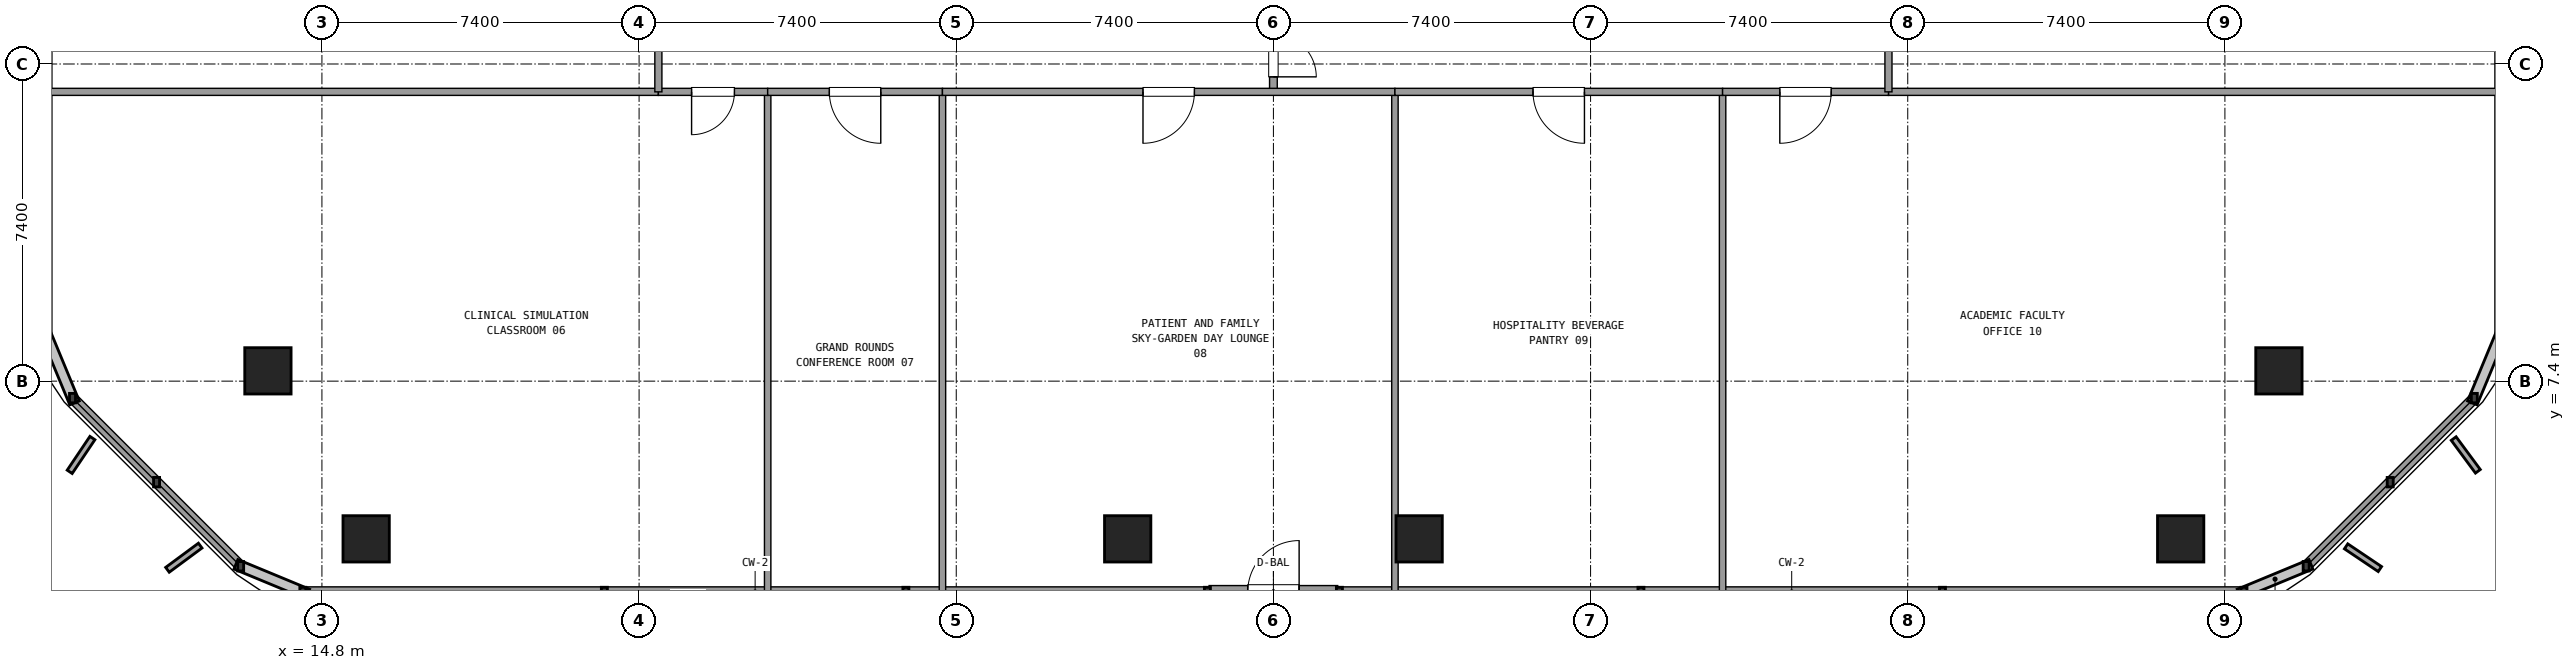
"""IFC4 building model, lengths in metres.
Left out: names, types, materials, properties, quantities, classifications, styles, units other than length and angle.
Written with IfcOpenShell. Run it as: python <this file> out.ifc"""

import sys

from ifc_helpers import new_model, si_unit, direction, frame, frame_2d, origin, origin_2d, place, context, subcontext, project, spatial, rectangle, extrude, element, fill, save


model = new_model("IFC4")
c1 = context("Model", 3, precision=1e-05, world=origin(), true_north=direction((0.0, 1.0)))
c2 = subcontext(c1, "Body", "Model", "MODEL_VIEW")
j1 = project(units=[si_unit("LENGTHUNIT", "METRE"), si_unit("PLANEANGLEUNIT", "RADIAN")], contexts=[c1])
p1 = place(None, origin())
s1 = spatial("IfcSite", under=j1, at=p1, CompositionType="ELEMENT")
p2 = place(p1, origin())
s2 = spatial("IfcBuilding", under=s1, at=p2, CompositionType="ELEMENT")
p3 = place(p2, frame((0.0, 0.0, 52.74)))
s3 = spatial("IfcBuildingStorey", under=s2, at=p3, CompositionType="ELEMENT", Elevation=52.74)
for number, where, z_axis, x_axis in (
    (1, (13.54, 7.64, 0.0), (0.0, 0.0, 1.0), (1.0, 0.0, 0.0)),
    (2, (15.832, 3.72, 0.0), (0.0, 0.0, 1.0), (1.0, 0.0, 0.0)),
    (3, (33.6, 3.72, 0.0), (0.0, 0.0, 1.0), (1.0, 0.0, 0.0)),
    (4, (40.4, 3.72, 0.0), (0.0, 0.0, 1.0), (1.0, 0.0, 0.0)),
    (5, (58.168, 3.72, 0.0), (0.0, 0.0, 1.0), (1.0, 0.0, 0.0)),
    (6, (60.46, 7.64, 0.0), (0.0, 0.0, 1.0), (1.0, 0.0, 0.0)),
):
    element("IfcColumn", number, at=place(p3, frame(where, z_axis=z_axis, x_axis=x_axis)), inside=s3, PredefinedType="COLUMN", context=c2, shape_type="SweptSolid", body=[
        extrude(rectangle(XDim=1.08, YDim=1.08, at=origin_2d()), origin(), (0.0, 0.0, 1.0), 3.6),
    ])
p4 = place(p3, frame((35.5, 2.48, 0.0), z_axis=(0.0, 0.0, 1.0), x_axis=(1.0, 0.0, 0.0)))
e7 = element("IfcWall", 7, at=p4, inside=s3, PredefinedType="SOLIDWALL", context=c2, shape_type="SweptSolid", body=[
    extrude(rectangle(XDim=3.0, YDim=0.3, at=frame_2d((1.5, 0.0))), origin(), (0.0, 0.0, 1.0), 2.65),
])
p5 = place(p4, frame((0.9, 0.0, 0.0)))
e8 = element("IfcOpeningElement", 8, at=p5, cuts=e7, PredefinedType="OPENING", context=c2, shape_type="SweptSolid", body=[
    extrude(rectangle(XDim=1.2, YDim=2.2, at=frame_2d((0.6, 1.1))), frame((0.0, 0.16, 0.0), z_axis=(0.0, -1.0, 0.0), x_axis=(1.0, 0.0, 0.0)), (0.0, 0.0, 1.0), 0.32),
])
for number, where, z_axis, x_axis in (
    (9, (14.355, 2.48, 0.0), (0.0, 0.0, 1.0), (1.0, 0.0, 0.0)),
    (10, (38.54, 2.48, 0.0), (0.0, 0.0, 1.0), (1.0, 0.0, 0.0)),
):
    element("IfcWall", number, at=place(p3, frame(where, z_axis=z_axis, x_axis=x_axis)), inside=s3, PredefinedType="SOLIDWALL", context=c2, shape_type="SweptSolid", body=[
        extrude(rectangle(XDim=21.105, YDim=0.24, at=frame_2d((10.552, 0.0))), origin(), (0.0, 0.0, 1.0), 0.85),
    ])
for number, where, z_axis, x_axis in (
    (11, (61.096, 3.081, 0.0), (0.0, 0.0, 1.0), (0.707, 0.707, 0.0)),
    (12, (8.981, 7.004, 0.0), (0.0, 0.0, 1.0), (0.707, -0.707, 0.0)),
):
    element("IfcWall", number, at=place(p3, frame(where, z_axis=z_axis, x_axis=x_axis)), inside=s3, PredefinedType="SOLIDWALL", context=c2, shape_type="SweptSolid", body=[
        extrude(rectangle(XDim=5.548, YDim=0.24, at=frame_2d((2.774, 0.0))), origin(), (0.0, 0.0, 1.0), 0.85),
    ])
p6 = place(p3, frame((37.0, 14.15, 0.0), z_axis=(0.0, 0.0, 1.0), x_axis=(0.0, 1.0, 0.0)))
e13 = element("IfcWall", 13, at=p6, inside=s3, PredefinedType="PARTITIONING", context=c2, shape_type="SweptSolid", body=[
    extrude(rectangle(XDim=2.7, YDim=0.18, at=frame_2d((1.35, 0.0))), origin(), (0.0, 0.0, 1.0), 2.61),
])
p7 = place(p6, frame((0.35, 0.0, 0.0)))
e14 = element("IfcOpeningElement", 14, at=p7, cuts=e13, PredefinedType="OPENING", context=c2, shape_type="SweptSolid", body=[
    extrude(rectangle(XDim=2.0, YDim=2.2, at=frame_2d((1.0, 1.1))), frame((0.0, 0.1, 0.0), z_axis=(0.0, -1.0, 0.0), x_axis=(1.0, 0.0, 0.0)), (0.0, 0.0, 1.0), 0.2),
])
for number, where, z_axis, x_axis in (
    (15, (8.4, 14.15, 0.0), (0.0, 0.0, 1.0), (1.0, 0.0, 0.0)),
    (16, (51.35, 14.15, 0.0), (0.0, 0.0, 1.0), (1.0, 0.0, 0.0)),
):
    element("IfcWall", number, at=place(p3, frame(where, z_axis=z_axis, x_axis=x_axis)), inside=s3, PredefinedType="PARTITIONING", context=c2, shape_type="SweptSolid", body=[
        extrude(rectangle(XDim=14.25, YDim=0.165, at=frame_2d((7.125, 0.0))), origin(), (0.0, 0.0, 1.0), 2.61),
    ])
p8 = place(p3, frame((25.2, 14.15, 0.0), z_axis=(0.0, 0.0, 1.0), x_axis=(0.0, -1.0, 0.0)))
e17 = element("IfcWall", 17, at=p8, inside=s3, PredefinedType="PARTITIONING", context=c2, shape_type="SweptSolid", body=[
    extrude(rectangle(XDim=11.65, YDim=0.15, at=frame_2d((5.825, 0.0))), origin(), (0.0, 0.0, 1.0), 2.61),
])
p9 = place(p3, frame((22.65, 14.15, 0.0), z_axis=(0.0, 0.0, 1.0), x_axis=(1.0, 0.0, 0.0)))
e18 = element("IfcWall", 18, at=p9, inside=s3, PredefinedType="PARTITIONING", context=c2, shape_type="SweptSolid", body=[
    extrude(rectangle(XDim=2.55, YDim=0.165, at=frame_2d((1.275, 0.0))), origin(), (0.0, 0.0, 1.0), 2.61),
])
p10 = place(p9, frame((0.775, 0.0, 0.0)))
e19 = element("IfcOpeningElement", 19, at=p10, cuts=e18, PredefinedType="OPENING", context=c2, shape_type="SweptSolid", body=[
    extrude(rectangle(XDim=1.0, YDim=2.15, at=frame_2d((0.5, 1.075))), frame((0.0, 0.093, 0.0), z_axis=(0.0, -1.0, 0.0), x_axis=(1.0, 0.0, 0.0)), (0.0, 0.0, 1.0), 0.185),
])
p11 = place(p3, frame((29.278, 14.15, 0.0), z_axis=(0.0, 0.0, 1.0), x_axis=(0.0, -1.0, 0.0)))
e20 = element("IfcWall", 20, at=p11, inside=s3, PredefinedType="PARTITIONING", context=c2, shape_type="SweptSolid", body=[
    extrude(rectangle(XDim=11.65, YDim=0.15, at=frame_2d((5.825, 0.0))), origin(), (0.0, 0.0, 1.0), 2.61),
])
p12 = place(p3, frame((25.2, 14.15, 0.0), z_axis=(0.0, 0.0, 1.0), x_axis=(1.0, 0.0, 0.0)))
e21 = element("IfcWall", 21, at=p12, inside=s3, PredefinedType="PARTITIONING", context=c2, shape_type="SweptSolid", body=[
    extrude(rectangle(XDim=4.078, YDim=0.165, at=frame_2d((2.039, 0.0))), origin(), (0.0, 0.0, 1.0), 2.61),
])
p13 = place(p12, frame((1.439, 0.0, 0.0)))
e22 = element("IfcOpeningElement", 22, at=p13, cuts=e21, PredefinedType="OPENING", context=c2, shape_type="SweptSolid", body=[
    extrude(rectangle(XDim=1.2, YDim=2.15, at=frame_2d((0.6, 1.075))), frame((0.0, 0.093, 0.0), z_axis=(0.0, -1.0, 0.0), x_axis=(1.0, 0.0, 0.0)), (0.0, 0.0, 1.0), 0.185),
])
p14 = place(p3, frame((39.835, 14.15, 0.0), z_axis=(0.0, 0.0, 1.0), x_axis=(0.0, -1.0, 0.0)))
e23 = element("IfcWall", 23, at=p14, inside=s3, PredefinedType="PARTITIONING", context=c2, shape_type="SweptSolid", body=[
    extrude(rectangle(XDim=11.65, YDim=0.15, at=frame_2d((5.825, 0.0))), origin(), (0.0, 0.0, 1.0), 2.61),
])
p15 = place(p3, frame((29.278, 14.15, 0.0), z_axis=(0.0, 0.0, 1.0), x_axis=(1.0, 0.0, 0.0)))
e24 = element("IfcWall", 24, at=p15, inside=s3, PredefinedType="PARTITIONING", context=c2, shape_type="SweptSolid", body=[
    extrude(rectangle(XDim=10.557, YDim=0.165, at=frame_2d((5.278, 0.0))), origin(), (0.0, 0.0, 1.0), 2.61),
])
p16 = place(p15, frame((4.679, 0.0, 0.0)))
e25 = element("IfcOpeningElement", 25, at=p16, cuts=e24, PredefinedType="OPENING", context=c2, shape_type="SweptSolid", body=[
    extrude(rectangle(XDim=1.2, YDim=2.15, at=frame_2d((0.6, 1.075))), frame((0.0, 0.093, 0.0), z_axis=(0.0, -1.0, 0.0), x_axis=(1.0, 0.0, 0.0)), (0.0, 0.0, 1.0), 0.185),
])
p17 = place(p3, frame((47.48, 14.15, 0.0), z_axis=(0.0, 0.0, 1.0), x_axis=(0.0, -1.0, 0.0)))
e26 = element("IfcWall", 26, at=p17, inside=s3, PredefinedType="PARTITIONING", context=c2, shape_type="SweptSolid", body=[
    extrude(rectangle(XDim=11.65, YDim=0.15, at=frame_2d((5.825, 0.0))), origin(), (0.0, 0.0, 1.0), 2.61),
])
p18 = place(p3, frame((39.835, 14.15, 0.0), z_axis=(0.0, 0.0, 1.0), x_axis=(1.0, 0.0, 0.0)))
e27 = element("IfcWall", 27, at=p18, inside=s3, PredefinedType="PARTITIONING", context=c2, shape_type="SweptSolid", body=[
    extrude(rectangle(XDim=7.645, YDim=0.165, at=frame_2d((3.823, 0.0))), origin(), (0.0, 0.0, 1.0), 2.61),
])
p19 = place(p18, frame((3.222, 0.0, 0.0)))
e28 = element("IfcOpeningElement", 28, at=p19, cuts=e27, PredefinedType="OPENING", context=c2, shape_type="SweptSolid", body=[
    extrude(rectangle(XDim=1.2, YDim=2.15, at=frame_2d((0.6, 1.075))), frame((0.0, 0.093, 0.0), z_axis=(0.0, -1.0, 0.0), x_axis=(1.0, 0.0, 0.0)), (0.0, 0.0, 1.0), 0.185),
])
p20 = place(p3, frame((47.48, 14.15, 0.0), z_axis=(0.0, 0.0, 1.0), x_axis=(1.0, 0.0, 0.0)))
e29 = element("IfcWall", 29, at=p20, inside=s3, PredefinedType="PARTITIONING", context=c2, shape_type="SweptSolid", body=[
    extrude(rectangle(XDim=3.87, YDim=0.165, at=frame_2d((1.935, 0.0))), origin(), (0.0, 0.0, 1.0), 2.61),
])
p21 = place(p20, frame((1.335, 0.0, 0.0)))
e30 = element("IfcOpeningElement", 30, at=p21, cuts=e29, PredefinedType="OPENING", context=c2, shape_type="SweptSolid", body=[
    extrude(rectangle(XDim=1.2, YDim=2.15, at=frame_2d((0.6, 1.075))), frame((0.0, 0.093, 0.0), z_axis=(0.0, -1.0, 0.0), x_axis=(1.0, 0.0, 0.0)), (0.0, 0.0, 1.0), 0.185),
])
p22 = place(p3, frame((22.65, 14.15, 0.0), z_axis=(0.0, 0.0, 1.0), x_axis=(0.0, 1.0, 0.0)))
e31 = element("IfcWall", 31, at=p22, inside=s3, PredefinedType="PARTITIONING", context=c2, shape_type="SweptSolid", body=[
    extrude(rectangle(XDim=5.875, YDim=0.165, at=frame_2d((2.938, 0.0))), origin(), (0.0, 0.0, 1.0), 2.61),
])
p23 = place(p22, frame((2.337, 0.0, 0.0)))
e32 = element("IfcOpeningElement", 32, at=p23, cuts=e31, PredefinedType="OPENING", context=c2, shape_type="SweptSolid", body=[
    extrude(rectangle(XDim=1.2, YDim=2.15, at=frame_2d((0.6, 1.075))), frame((0.0, 0.093, 0.0), z_axis=(0.0, -1.0, 0.0), x_axis=(1.0, 0.0, 0.0)), (0.0, 0.0, 1.0), 0.185),
])
p24 = place(p3, frame((51.35, 14.15, 0.0), z_axis=(0.0, 0.0, 1.0), x_axis=(0.0, 1.0, 0.0)))
e33 = element("IfcWall", 33, at=p24, inside=s3, PredefinedType="PARTITIONING", context=c2, shape_type="SweptSolid", body=[
    extrude(rectangle(XDim=7.99, YDim=0.165, at=frame_2d((3.995, 0.0))), origin(), (0.0, 0.0, 1.0), 2.61),
])
p25 = place(p24, frame((3.395, 0.0, 0.0)))
e34 = element("IfcOpeningElement", 34, at=p25, cuts=e33, PredefinedType="OPENING", context=c2, shape_type="SweptSolid", body=[
    extrude(rectangle(XDim=1.2, YDim=2.15, at=frame_2d((0.6, 1.075))), frame((0.0, 0.093, 0.0), z_axis=(0.0, -1.0, 0.0), x_axis=(1.0, 0.0, 0.0)), (0.0, 0.0, 1.0), 0.185),
])
p26 = place(p7, frame((2.0, 0.0, 0.0), z_axis=(0.0, 0.0, 1.0), x_axis=(-1.0, 0.0, 0.0)))
e35 = element("IfcDoor", 35, at=p26, inside=s3, OperationType="DOUBLE_DOOR_SINGLE_SWING", PredefinedType="DOOR", context=c2, shape_type="SweptSolid", body=[
    extrude(rectangle(XDim=2.0, YDim=2.2, at=frame_2d((1.0, 1.1))), frame((0.0, 0.025, 0.0), z_axis=(0.0, -1.0, 0.0), x_axis=(1.0, 0.0, 0.0)), (0.0, 0.0, 1.0), 0.05),
])
fill(e14, e35)
p27 = place(p10, frame((1.0, 0.0, 0.0), z_axis=(0.0, 0.0, 1.0), x_axis=(-1.0, 0.0, 0.0)))
e36 = element("IfcDoor", 36, at=p27, inside=s3, OperationType="SINGLE_SWING_LEFT", PredefinedType="DOOR", context=c2, shape_type="SweptSolid", body=[
    extrude(rectangle(XDim=1.0, YDim=2.15, at=frame_2d((0.5, 1.075))), frame((0.0, 0.025, 0.0), z_axis=(0.0, -1.0, 0.0), x_axis=(1.0, 0.0, 0.0)), (0.0, 0.0, 1.0), 0.05),
])
fill(e19, e36)
p28 = place(p13, frame((1.2, 0.0, 0.0), z_axis=(0.0, 0.0, 1.0), x_axis=(-1.0, 0.0, 0.0)))
e37 = element("IfcDoor", 37, at=p28, inside=s3, OperationType="SINGLE_SWING_RIGHT", PredefinedType="DOOR", context=c2, shape_type="SweptSolid", body=[
    extrude(rectangle(XDim=1.2, YDim=2.15, at=frame_2d((0.6, 1.075))), frame((0.0, 0.025, 0.0), z_axis=(0.0, -1.0, 0.0), x_axis=(1.0, 0.0, 0.0)), (0.0, 0.0, 1.0), 0.05),
])
fill(e22, e37)
p29 = place(p16, frame((1.2, 0.0, 0.0), z_axis=(0.0, 0.0, 1.0), x_axis=(-1.0, 0.0, 0.0)))
e38 = element("IfcDoor", 38, at=p29, inside=s3, OperationType="SINGLE_SWING_LEFT", PredefinedType="DOOR", context=c2, shape_type="SweptSolid", body=[
    extrude(rectangle(XDim=1.2, YDim=2.15, at=frame_2d((0.6, 1.075))), frame((0.0, 0.025, 0.0), z_axis=(0.0, -1.0, 0.0), x_axis=(1.0, 0.0, 0.0)), (0.0, 0.0, 1.0), 0.05),
])
fill(e25, e38)
p30 = place(p19, frame((1.2, 0.0, 0.0), z_axis=(0.0, 0.0, 1.0), x_axis=(-1.0, 0.0, 0.0)))
e39 = element("IfcDoor", 39, at=p30, inside=s3, OperationType="SINGLE_SWING_RIGHT", PredefinedType="DOOR", context=c2, shape_type="SweptSolid", body=[
    extrude(rectangle(XDim=1.2, YDim=2.15, at=frame_2d((0.6, 1.075))), frame((0.0, 0.025, 0.0), z_axis=(0.0, -1.0, 0.0), x_axis=(1.0, 0.0, 0.0)), (0.0, 0.0, 1.0), 0.05),
])
fill(e28, e39)
p31 = place(p21, frame((1.2, 0.0, 0.0), z_axis=(0.0, 0.0, 1.0), x_axis=(-1.0, 0.0, 0.0)))
e40 = element("IfcDoor", 40, at=p31, inside=s3, OperationType="SINGLE_SWING_LEFT", PredefinedType="DOOR", context=c2, shape_type="SweptSolid", body=[
    extrude(rectangle(XDim=1.2, YDim=2.15, at=frame_2d((0.6, 1.075))), frame((0.0, 0.025, 0.0), z_axis=(0.0, -1.0, 0.0), x_axis=(1.0, 0.0, 0.0)), (0.0, 0.0, 1.0), 0.05),
])
fill(e30, e40)
save(model, sys.argv[1])
